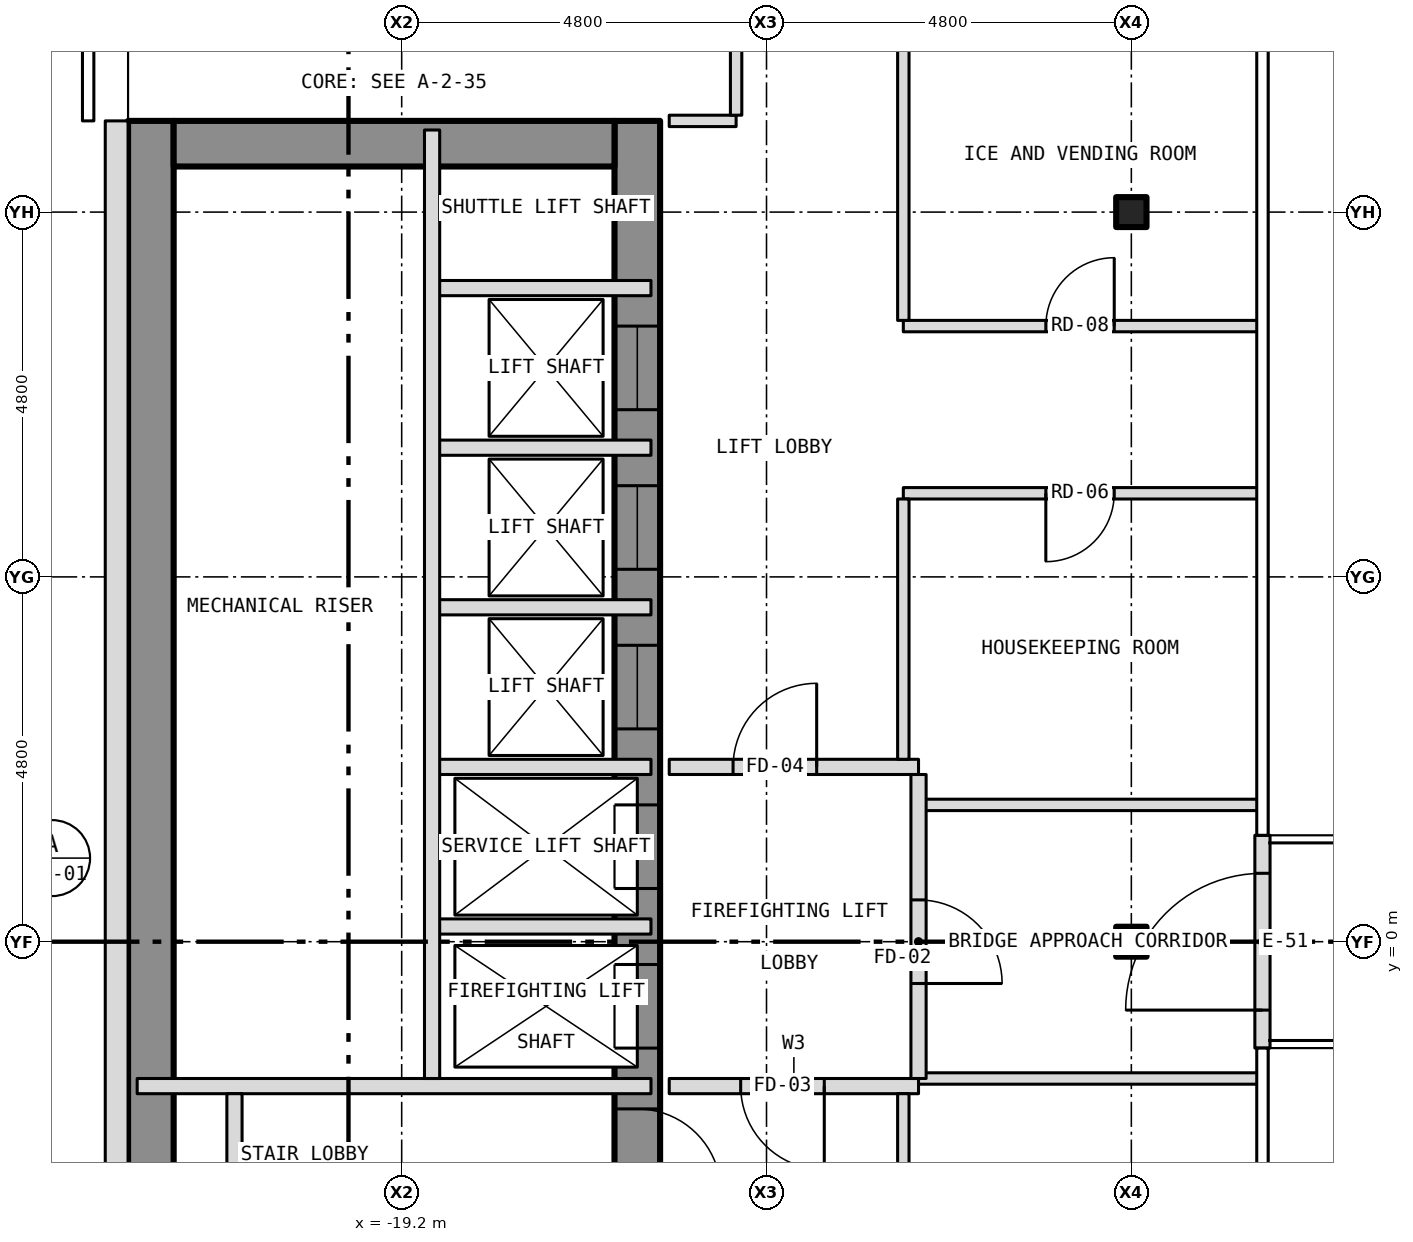
"""IFC4 building model, lengths in metres.
Left out: names, types, materials, properties, quantities, classifications, styles, units other than length and angle.
Written with IfcOpenShell. Run it as: python <this file> out.ifc"""

import sys

from ifc_helpers import new_model, si_unit, direction, frame, frame_2d, origin, origin_2d, place, context, subcontext, project, spatial, rectangle, i_section, extrude, element, fill, save


model = new_model("IFC4")
c1 = context("Model", 3, precision=1e-05, world=origin(), true_north=direction((0.0, 1.0)))
c2 = subcontext(c1, "Body", "Model", "MODEL_VIEW")
j1 = project(units=[si_unit("LENGTHUNIT", "METRE"), si_unit("PLANEANGLEUNIT", "RADIAN")], contexts=[c1])
p1 = place(None, origin())
s1 = spatial("IfcSite", under=j1, at=p1, CompositionType="ELEMENT")
p2 = place(p1, origin())
s2 = spatial("IfcBuilding", under=s1, at=p2, CompositionType="ELEMENT")
p3 = place(p2, frame((0.0, 0.0, 127.5)))
s3 = spatial("IfcBuildingStorey", under=s2, at=p3, CompositionType="ELEMENT", Elevation=127.5)
for number, where, z_axis, x_axis in (
    (1, (-9.6, 0.0, -0.15), (0.0, 0.0, 1.0), (1.0, 0.0, 0.0)),
    (2, (-9.6, 9.6, -0.15), (0.0, 0.0, 1.0), (1.0, 0.0, 0.0)),
):
    element("IfcColumn", number, at=place(p3, frame(where, z_axis=z_axis, x_axis=x_axis)), inside=s3, PredefinedType="COLUMN", context=c2, shape_type="SweptSolid", body=[
        extrude(i_section(OverallWidth=0.399, OverallDepth=0.394, WebThickness=0.023, FlangeThickness=0.037, at=origin_2d()), origin(), (0.0, 0.0, 1.0), 3.5),
    ])
p4 = place(p3, frame((-16.1, -10.8, 0.0), z_axis=(0.0, 0.0, 1.0), x_axis=(0.0, 1.0, 0.0)))
e3 = element("IfcWall", 3, at=p4, inside=s3, PredefinedType="SHEAR", context=c2, shape_type="SweptSolid", body=[
    extrude(rectangle(XDim=21.6, YDim=0.6, at=frame_2d((10.8, 0.0))), origin(), (0.0, 0.0, 1.0), 3.25),
])
p5 = place(p4, frame((9.4, 0.0, 0.0)))
e4 = element("IfcOpeningElement", 4, at=p5, cuts=e3, PredefinedType="OPENING", context=c2, shape_type="SweptSolid", body=[
    extrude(rectangle(XDim=1.1, YDim=2.1, at=frame_2d((0.55, 1.05))), frame((0.0, 0.312, 0.0), z_axis=(0.0, -1.0, 0.0), x_axis=(1.0, 0.0, 0.0)), (0.0, 0.0, 1.0), 0.624),
])
p6 = place(p4, frame((11.5, 0.0, 0.0)))
e5 = element("IfcOpeningElement", 5, at=p6, cuts=e3, PredefinedType="OPENING", context=c2, shape_type="SweptSolid", body=[
    extrude(rectangle(XDim=1.1, YDim=2.1, at=frame_2d((0.55, 1.05))), frame((0.0, 0.312, 0.0), z_axis=(0.0, -1.0, 0.0), x_axis=(1.0, 0.0, 0.0)), (0.0, 0.0, 1.0), 0.624),
])
p7 = place(p4, frame((13.6, 0.0, 0.0)))
e6 = element("IfcOpeningElement", 6, at=p7, cuts=e3, PredefinedType="OPENING", context=c2, shape_type="SweptSolid", body=[
    extrude(rectangle(XDim=1.1, YDim=2.1, at=frame_2d((0.55, 1.05))), frame((0.0, 0.312, 0.0), z_axis=(0.0, -1.0, 0.0), x_axis=(1.0, 0.0, 0.0)), (0.0, 0.0, 1.0), 0.624),
])
p8 = place(p4, frame((15.7, 0.0, 0.0)))
e7 = element("IfcOpeningElement", 7, at=p8, cuts=e3, PredefinedType="OPENING", context=c2, shape_type="SweptSolid", body=[
    extrude(rectangle(XDim=1.1, YDim=2.1, at=frame_2d((0.55, 1.05))), frame((0.0, 0.312, 0.0), z_axis=(0.0, -1.0, 0.0), x_axis=(1.0, 0.0, 0.0)), (0.0, 0.0, 1.0), 0.624),
])
p9 = place(p4, frame((17.8, 0.0, 0.0)))
e8 = element("IfcOpeningElement", 8, at=p9, cuts=e3, PredefinedType="OPENING", context=c2, shape_type="SweptSolid", body=[
    extrude(rectangle(XDim=1.1, YDim=2.1, at=frame_2d((0.55, 1.05))), frame((0.0, 0.312, 0.0), z_axis=(0.0, -1.0, 0.0), x_axis=(1.0, 0.0, 0.0)), (0.0, 0.0, 1.0), 0.624),
])
p10 = place(p4, frame((0.758, 0.0, 0.0)))
e9 = element("IfcOpeningElement", 9, at=p10, cuts=e3, PredefinedType="OPENING", context=c2, shape_type="SweptSolid", body=[
    extrude(rectangle(XDim=1.1, YDim=2.1, at=frame_2d((0.55, 1.05))), frame((0.0, 0.312, 0.0), z_axis=(0.0, -1.0, 0.0), x_axis=(1.0, 0.0, 0.0)), (0.0, 0.0, 1.0), 0.624),
])
p11 = place(p4, frame((7.5, 0.0, 0.0)))
e10 = element("IfcOpeningElement", 10, at=p11, cuts=e3, PredefinedType="OPENING", context=c2, shape_type="SweptSolid", body=[
    extrude(rectangle(XDim=1.1, YDim=2.1, at=frame_2d((0.55, 1.05))), frame((0.0, 0.312, 0.0), z_axis=(0.0, -1.0, 0.0), x_axis=(1.0, 0.0, 0.0)), (0.0, 0.0, 1.0), 0.624),
])
p12 = place(p3, frame((-22.5, -10.8, 0.0), z_axis=(0.0, 0.0, 1.0), x_axis=(0.0, 1.0, 0.0)))
e11 = element("IfcWall", 11, at=p12, inside=s3, PredefinedType="SHEAR", context=c2, shape_type="SweptSolid", body=[
    extrude(rectangle(XDim=21.6, YDim=0.6, at=frame_2d((10.8, 0.0))), origin(), (0.0, 0.0, 1.0), 3.25),
])
p13 = place(p3, frame((-22.2, 10.5, 0.0), z_axis=(0.0, 0.0, 1.0), x_axis=(1.0, 0.0, 0.0)))
e12 = element("IfcWall", 12, at=p13, inside=s3, PredefinedType="SHEAR", context=c2, shape_type="SweptSolid", body=[
    extrude(rectangle(XDim=5.8, YDim=0.6, at=frame_2d((2.9, 0.0))), origin(), (0.0, 0.0, 1.0), 3.25),
])
p14 = place(p3, frame((-22.95, 10.8, 0.0), z_axis=(0.0, 0.0, 1.0), x_axis=(0.0, -1.0, 0.0)))
e13 = element("IfcWall", 13, at=p14, inside=s3, PredefinedType="SOLIDWALL", context=c2, shape_type="SweptSolid", body=[
    extrude(rectangle(XDim=21.6, YDim=0.3, at=frame_2d((10.8, 0.0))), origin(), (0.0, 0.0, 1.0), 3.5),
])
p15 = place(p14, frame((18.05, 0.0, 1.0)))
e14 = element("IfcOpeningElement", 14, at=p15, cuts=e13, PredefinedType="OPENING", context=c2, shape_type="SweptSolid", body=[
    extrude(rectangle(XDim=0.6, YDim=1.5, at=frame_2d((0.3, 0.75))), frame((0.0, 0.162, 0.0), z_axis=(0.0, -1.0, 0.0), x_axis=(1.0, 0.0, 0.0)), (0.0, 0.0, 1.0), 0.324),
])
p16 = place(p3, frame((-7.875, -1.4, 0.0), z_axis=(0.0, 0.0, 1.0), x_axis=(0.0, 1.0, 0.0)))
e15 = element("IfcWall", 15, at=p16, inside=s3, PredefinedType="SOLIDWALL", context=c2, shape_type="SweptSolid", body=[
    extrude(rectangle(XDim=2.8, YDim=0.2, at=frame_2d((1.4, 0.0))), origin(), (0.0, 0.0, 1.0), 3.5),
])
p17 = place(p16, frame((0.5, 0.0, 0.0)))
e16 = element("IfcOpeningElement", 16, at=p17, cuts=e15, PredefinedType="OPENING", context=c2, shape_type="SweptSolid", body=[
    extrude(rectangle(XDim=1.8, YDim=2.1, at=frame_2d((0.9, 1.05))), frame((0.0, 0.112, 0.0), z_axis=(0.0, -1.0, 0.0), x_axis=(1.0, 0.0, 0.0)), (0.0, 0.0, 1.0), 0.224),
])
p18 = place(p3, frame((-22.68, -1.9, 0.0), z_axis=(0.0, 0.0, 1.0), x_axis=(1.0, 0.0, 0.0)))
e17 = element("IfcWall", 17, at=p18, inside=s3, PredefinedType="PARTITIONING", context=c2, shape_type="SweptSolid", body=[
    extrude(rectangle(XDim=6.76, YDim=0.2, at=frame_2d((3.38, 0.0))), origin(), (0.0, 0.0, 1.0), 3.25),
])
p19 = place(p3, frame((-15.68, -1.9, 0.0), z_axis=(0.0, 0.0, 1.0), x_axis=(1.0, 0.0, 0.0)))
e18 = element("IfcWall", 18, at=p19, inside=s3, PredefinedType="PARTITIONING", context=c2, shape_type="SweptSolid", body=[
    extrude(rectangle(XDim=3.28, YDim=0.2, at=frame_2d((1.64, 0.0))), origin(), (0.0, 0.0, 1.0), 3.35),
])
p20 = place(p19, frame((0.94, 0.0, 0.0)))
e19 = element("IfcOpeningElement", 19, at=p20, cuts=e18, PredefinedType="OPENING", context=c2, shape_type="SweptSolid", body=[
    extrude(rectangle(XDim=1.1, YDim=2.1, at=frame_2d((0.55, 1.05))), frame((0.0, 0.112, 0.0), z_axis=(0.0, -1.0, 0.0), x_axis=(1.0, 0.0, 0.0)), (0.0, 0.0, 1.0), 0.224),
])
p21 = place(p3, frame((-12.4, -1.8, 0.0), z_axis=(0.0, 0.0, 1.0), x_axis=(1.0, 0.0, 0.0)))
e20 = element("IfcWall", 20, at=p21, inside=s3, PredefinedType="PARTITIONING", context=c2, shape_type="SweptSolid", body=[
    extrude(rectangle(XDim=4.48, YDim=0.15, at=frame_2d((2.24, 0.0))), origin(), (0.0, 0.0, 1.0), 3.35),
])
p22 = place(p3, frame((-18.8, 0.2, 0.0), z_axis=(0.0, 0.0, 1.0), x_axis=(1.0, 0.0, 0.0)))
e21 = element("IfcWall", 21, at=p22, inside=s3, PredefinedType="PARTITIONING", context=c2, shape_type="SweptSolid", body=[
    extrude(rectangle(XDim=2.88, YDim=0.2, at=frame_2d((1.44, 0.0))), origin(), (0.0, 0.0, 1.0), 3.25),
])
p23 = place(p3, frame((-12.4, 1.8, 0.0), z_axis=(0.0, 0.0, 1.0), x_axis=(1.0, 0.0, 0.0)))
e22 = element("IfcWall", 22, at=p23, inside=s3, PredefinedType="PARTITIONING", context=c2, shape_type="SweptSolid", body=[
    extrude(rectangle(XDim=4.48, YDim=0.15, at=frame_2d((2.24, 0.0))), origin(), (0.0, 0.0, 1.0), 3.35),
])
p24 = place(p3, frame((-18.8, 2.3, 0.0), z_axis=(0.0, 0.0, 1.0), x_axis=(1.0, 0.0, 0.0)))
e23 = element("IfcWall", 23, at=p24, inside=s3, PredefinedType="PARTITIONING", context=c2, shape_type="SweptSolid", body=[
    extrude(rectangle(XDim=2.88, YDim=0.2, at=frame_2d((1.44, 0.0))), origin(), (0.0, 0.0, 1.0), 3.25),
])
p25 = place(p3, frame((-15.68, 2.3, 0.0), z_axis=(0.0, 0.0, 1.0), x_axis=(1.0, 0.0, 0.0)))
e24 = element("IfcWall", 24, at=p25, inside=s3, PredefinedType="PARTITIONING", context=c2, shape_type="SweptSolid", body=[
    extrude(rectangle(XDim=3.28, YDim=0.2, at=frame_2d((1.64, 0.0))), origin(), (0.0, 0.0, 1.0), 3.35),
])
p26 = place(p25, frame((0.84, 0.0, 0.0)))
e25 = element("IfcOpeningElement", 25, at=p26, cuts=e24, PredefinedType="OPENING", context=c2, shape_type="SweptSolid", body=[
    extrude(rectangle(XDim=1.1, YDim=2.1, at=frame_2d((0.55, 1.05))), frame((0.0, 0.112, 0.0), z_axis=(0.0, -1.0, 0.0), x_axis=(1.0, 0.0, 0.0)), (0.0, 0.0, 1.0), 0.224),
])
p27 = place(p3, frame((-18.8, 4.4, 0.0), z_axis=(0.0, 0.0, 1.0), x_axis=(1.0, 0.0, 0.0)))
e26 = element("IfcWall", 26, at=p27, inside=s3, PredefinedType="PARTITIONING", context=c2, shape_type="SweptSolid", body=[
    extrude(rectangle(XDim=2.88, YDim=0.2, at=frame_2d((1.44, 0.0))), origin(), (0.0, 0.0, 1.0), 3.25),
])
p28 = place(p3, frame((-12.6, 5.9, 0.0), z_axis=(0.0, 0.0, 1.0), x_axis=(1.0, 0.0, 0.0)))
e27 = element("IfcWall", 27, at=p28, inside=s3, PredefinedType="PARTITIONING", context=c2, shape_type="SweptSolid", body=[
    extrude(rectangle(XDim=4.68, YDim=0.15, at=frame_2d((2.34, 0.0))), origin(), (0.0, 0.0, 1.0), 3.35),
])
p29 = place(p28, frame((1.875, 0.0, 0.0)))
e28 = element("IfcOpeningElement", 28, at=p29, cuts=e27, PredefinedType="OPENING", context=c2, shape_type="SweptSolid", body=[
    extrude(rectangle(XDim=0.9, YDim=2.1, at=frame_2d((0.45, 1.05))), frame((0.0, 0.087, 0.0), z_axis=(0.0, -1.0, 0.0), x_axis=(1.0, 0.0, 0.0)), (0.0, 0.0, 1.0), 0.174),
])
p30 = place(p3, frame((-18.8, 6.5, 0.0), z_axis=(0.0, 0.0, 1.0), x_axis=(1.0, 0.0, 0.0)))
e29 = element("IfcWall", 29, at=p30, inside=s3, PredefinedType="PARTITIONING", context=c2, shape_type="SweptSolid", body=[
    extrude(rectangle(XDim=2.88, YDim=0.2, at=frame_2d((1.44, 0.0))), origin(), (0.0, 0.0, 1.0), 3.25),
])
p31 = place(p3, frame((-12.6, 8.1, 0.0), z_axis=(0.0, 0.0, 1.0), x_axis=(1.0, 0.0, 0.0)))
e30 = element("IfcWall", 30, at=p31, inside=s3, PredefinedType="PARTITIONING", context=c2, shape_type="SweptSolid", body=[
    extrude(rectangle(XDim=4.68, YDim=0.15, at=frame_2d((2.34, 0.0))), origin(), (0.0, 0.0, 1.0), 3.35),
])
p32 = place(p31, frame((1.875, 0.0, 0.0)))
e31 = element("IfcOpeningElement", 31, at=p32, cuts=e30, PredefinedType="OPENING", context=c2, shape_type="SweptSolid", body=[
    extrude(rectangle(XDim=0.9, YDim=2.1, at=frame_2d((0.45, 1.05))), frame((0.0, 0.087, 0.0), z_axis=(0.0, -1.0, 0.0), x_axis=(1.0, 0.0, 0.0)), (0.0, 0.0, 1.0), 0.174),
])
p33 = place(p3, frame((-18.8, 8.6, 0.0), z_axis=(0.0, 0.0, 1.0), x_axis=(1.0, 0.0, 0.0)))
e32 = element("IfcWall", 32, at=p33, inside=s3, PredefinedType="PARTITIONING", context=c2, shape_type="SweptSolid", body=[
    extrude(rectangle(XDim=2.88, YDim=0.2, at=frame_2d((1.44, 0.0))), origin(), (0.0, 0.0, 1.0), 3.25),
])
p34 = place(p3, frame((-15.68, 10.8, 0.0), z_axis=(0.0, 0.0, 1.0), x_axis=(1.0, 0.0, 0.0)))
e33 = element("IfcWall", 33, at=p34, inside=s3, PredefinedType="PARTITIONING", context=c2, shape_type="SweptSolid", body=[
    extrude(rectangle(XDim=0.88, YDim=0.15, at=frame_2d((0.44, 0.0))), origin(), (0.0, 0.0, 1.0), 3.35),
])
p35 = place(p3, frame((-21.4, -10.68, 0.0), z_axis=(0.0, 0.0, 1.0), x_axis=(0.0, 1.0, 0.0)))
e34 = element("IfcWall", 34, at=p35, inside=s3, PredefinedType="PARTITIONING", context=c2, shape_type="SweptSolid", body=[
    extrude(rectangle(XDim=8.68, YDim=0.2, at=frame_2d((4.34, 0.0))), origin(), (0.0, 0.0, 1.0), 3.25),
])
p36 = place(p35, frame((3.88, 0.0, 0.0)))
e35 = element("IfcOpeningElement", 35, at=p36, cuts=e34, PredefinedType="OPENING", context=c2, shape_type="SweptSolid", body=[
    extrude(rectangle(XDim=0.9, YDim=2.1, at=frame_2d((0.45, 1.05))), frame((0.0, 0.112, 0.0), z_axis=(0.0, -1.0, 0.0), x_axis=(1.0, 0.0, 0.0)), (0.0, 0.0, 1.0), 0.224),
])
p37 = place(p3, frame((-18.8, -1.8, 0.0), z_axis=(0.0, 0.0, 1.0), x_axis=(0.0, 1.0, 0.0)))
e36 = element("IfcWall", 36, at=p37, inside=s3, PredefinedType="PARTITIONING", context=c2, shape_type="SweptSolid", body=[
    extrude(rectangle(XDim=12.48, YDim=0.2, at=frame_2d((6.24, 0.0))), origin(), (0.0, 0.0, 1.0), 3.25),
])
p38 = place(p3, frame((-14.8, 10.875, 0.0), z_axis=(0.0, 0.0, 1.0), x_axis=(0.0, 1.0, 0.0)))
e37 = element("IfcWall", 37, at=p38, inside=s3, PredefinedType="PARTITIONING", context=c2, shape_type="SweptSolid", body=[
    extrude(rectangle(XDim=3.85, YDim=0.15, at=frame_2d((1.925, 0.0))), origin(), (0.0, 0.0, 1.0), 3.35),
])
p39 = place(p38, frame((2.325, 0.0, 0.0)))
e38 = element("IfcOpeningElement", 38, at=p39, cuts=e37, PredefinedType="OPENING", context=c2, shape_type="SweptSolid", body=[
    extrude(rectangle(XDim=1.0, YDim=2.1, at=frame_2d((0.5, 1.05))), frame((0.0, 0.087, 0.0), z_axis=(0.0, -1.0, 0.0), x_axis=(1.0, 0.0, 0.0)), (0.0, 0.0, 1.0), 0.174),
])
p40 = place(p3, frame((-12.6, -12.525, 0.0), z_axis=(0.0, 0.0, 1.0), x_axis=(0.0, 1.0, 0.0)))
e39 = element("IfcWall", 39, at=p40, inside=s3, PredefinedType="PARTITIONING", context=c2, shape_type="SweptSolid", body=[
    extrude(rectangle(XDim=10.525, YDim=0.15, at=frame_2d((5.262, 0.0))), origin(), (0.0, 0.0, 1.0), 3.35),
])
p41 = place(p40, frame((4.825, 0.0, 0.0)))
e40 = element("IfcOpeningElement", 40, at=p41, cuts=e39, PredefinedType="OPENING", context=c2, shape_type="SweptSolid", body=[
    extrude(rectangle(XDim=0.9, YDim=2.1, at=frame_2d((0.45, 1.05))), frame((0.0, 0.087, 0.0), z_axis=(0.0, -1.0, 0.0), x_axis=(1.0, 0.0, 0.0)), (0.0, 0.0, 1.0), 0.174),
])
p42 = place(p3, frame((-12.6, 2.4, 0.0), z_axis=(0.0, 0.0, 1.0), x_axis=(0.0, 1.0, 0.0)))
e41 = element("IfcWall", 41, at=p42, inside=s3, PredefinedType="PARTITIONING", context=c2, shape_type="SweptSolid", body=[
    extrude(rectangle(XDim=3.425, YDim=0.15, at=frame_2d((1.712, 0.0))), origin(), (0.0, 0.0, 1.0), 3.35),
])
p43 = place(p3, frame((-12.6, 8.175, 0.0), z_axis=(0.0, 0.0, 1.0), x_axis=(0.0, 1.0, 0.0)))
e42 = element("IfcWall", 42, at=p43, inside=s3, PredefinedType="PARTITIONING", context=c2, shape_type="SweptSolid", body=[
    extrude(rectangle(XDim=4.35, YDim=0.15, at=frame_2d((2.175, 0.0))), origin(), (0.0, 0.0, 1.0), 3.35),
])
p44 = place(p3, frame((-12.4, -1.8, 0.0), z_axis=(0.0, 0.0, 1.0), x_axis=(0.0, 1.0, 0.0)))
e43 = element("IfcWall", 43, at=p44, inside=s3, PredefinedType="PARTITIONING", context=c2, shape_type="SweptSolid", body=[
    extrude(rectangle(XDim=4.0, YDim=0.2, at=frame_2d((2.0, 0.0))), origin(), (0.0, 0.0, 1.0), 3.35),
])
p45 = place(p44, frame((1.25, 0.0, 0.0)))
e44 = element("IfcOpeningElement", 44, at=p45, cuts=e43, PredefinedType="OPENING", context=c2, shape_type="SweptSolid", body=[
    extrude(rectangle(XDim=1.1, YDim=2.1, at=frame_2d((0.55, 1.05))), frame((0.0, 0.112, 0.0), z_axis=(0.0, -1.0, 0.0), x_axis=(1.0, 0.0, 0.0)), (0.0, 0.0, 1.0), 0.224),
])
p46 = place(p17, origin())
e45 = element("IfcDoor", 45, at=p46, inside=s3, OperationType="DOUBLE_DOOR_DOUBLE_SWING", PredefinedType="DOOR", context=c2, shape_type="SweptSolid", body=[
    extrude(rectangle(XDim=1.8, YDim=2.1, at=frame_2d((0.9, 1.05))), frame((0.0, 0.025, 0.0), z_axis=(0.0, -1.0, 0.0), x_axis=(1.0, 0.0, 0.0)), (0.0, 0.0, 1.0), 0.05),
])
fill(e16, e45)
p47 = place(p5, origin())
e46 = element("IfcDoor", 46, at=p47, inside=s3, OperationType="SLIDING_TO_LEFT", PredefinedType="DOOR", context=c2, shape_type="SweptSolid", body=[
    extrude(rectangle(XDim=1.1, YDim=2.1, at=frame_2d((0.55, 1.05))), frame((0.0, 0.025, 0.0), z_axis=(0.0, -1.0, 0.0), x_axis=(1.0, 0.0, 0.0)), (0.0, 0.0, 1.0), 0.05),
])
fill(e4, e46)
p48 = place(p6, origin())
e47 = element("IfcDoor", 47, at=p48, inside=s3, OperationType="SLIDING_TO_LEFT", PredefinedType="DOOR", context=c2, shape_type="SweptSolid", body=[
    extrude(rectangle(XDim=1.1, YDim=2.1, at=frame_2d((0.55, 1.05))), frame((0.0, 0.025, 0.0), z_axis=(0.0, -1.0, 0.0), x_axis=(1.0, 0.0, 0.0)), (0.0, 0.0, 1.0), 0.05),
])
fill(e5, e47)
p49 = place(p7, origin())
e48 = element("IfcDoor", 48, at=p49, inside=s3, OperationType="SLIDING_TO_LEFT", PredefinedType="DOOR", context=c2, shape_type="SweptSolid", body=[
    extrude(rectangle(XDim=1.1, YDim=2.1, at=frame_2d((0.55, 1.05))), frame((0.0, 0.025, 0.0), z_axis=(0.0, -1.0, 0.0), x_axis=(1.0, 0.0, 0.0)), (0.0, 0.0, 1.0), 0.05),
])
fill(e6, e48)
p50 = place(p8, origin())
e49 = element("IfcDoor", 49, at=p50, inside=s3, OperationType="SLIDING_TO_LEFT", PredefinedType="DOOR", context=c2, shape_type="SweptSolid", body=[
    extrude(rectangle(XDim=1.1, YDim=2.1, at=frame_2d((0.55, 1.05))), frame((0.0, 0.025, 0.0), z_axis=(0.0, -1.0, 0.0), x_axis=(1.0, 0.0, 0.0)), (0.0, 0.0, 1.0), 0.05),
])
fill(e7, e49)
p51 = place(p9, origin())
e50 = element("IfcDoor", 50, at=p51, inside=s3, OperationType="SLIDING_TO_LEFT", PredefinedType="DOOR", context=c2, shape_type="SweptSolid", body=[
    extrude(rectangle(XDim=1.1, YDim=2.1, at=frame_2d((0.55, 1.05))), frame((0.0, 0.025, 0.0), z_axis=(0.0, -1.0, 0.0), x_axis=(1.0, 0.0, 0.0)), (0.0, 0.0, 1.0), 0.05),
])
fill(e8, e50)
p52 = place(p11, origin())
e51 = element("IfcDoor", 51, at=p52, inside=s3, OperationType="SINGLE_SWING_LEFT", PredefinedType="DOOR", context=c2, shape_type="SweptSolid", body=[
    extrude(rectangle(XDim=1.1, YDim=2.1, at=frame_2d((0.55, 1.05))), frame((0.0, 0.025, 0.0), z_axis=(0.0, -1.0, 0.0), x_axis=(1.0, 0.0, 0.0)), (0.0, 0.0, 1.0), 0.05),
])
fill(e10, e51)
p53 = place(p45, origin())
e52 = element("IfcDoor", 52, at=p53, inside=s3, OperationType="SINGLE_SWING_LEFT", PredefinedType="DOOR", context=c2, shape_type="SweptSolid", body=[
    extrude(rectangle(XDim=1.1, YDim=2.1, at=frame_2d((0.55, 1.05))), frame((0.0, 0.025, 0.0), z_axis=(0.0, -1.0, 0.0), x_axis=(1.0, 0.0, 0.0)), (0.0, 0.0, 1.0), 0.05),
])
fill(e44, e52)
p54 = place(p20, origin())
e53 = element("IfcDoor", 53, at=p54, inside=s3, OperationType="SINGLE_SWING_RIGHT", PredefinedType="DOOR", context=c2, shape_type="SweptSolid", body=[
    extrude(rectangle(XDim=1.1, YDim=2.1, at=frame_2d((0.55, 1.05))), frame((0.0, 0.025, 0.0), z_axis=(0.0, -1.0, 0.0), x_axis=(1.0, 0.0, 0.0)), (0.0, 0.0, 1.0), 0.05),
])
fill(e19, e53)
p55 = place(p26, origin())
e54 = element("IfcDoor", 54, at=p55, inside=s3, OperationType="SINGLE_SWING_RIGHT", PredefinedType="DOOR", context=c2, shape_type="SweptSolid", body=[
    extrude(rectangle(XDim=1.1, YDim=2.1, at=frame_2d((0.55, 1.05))), frame((0.0, 0.025, 0.0), z_axis=(0.0, -1.0, 0.0), x_axis=(1.0, 0.0, 0.0)), (0.0, 0.0, 1.0), 0.05),
])
fill(e25, e54)
p56 = place(p29, origin())
e55 = element("IfcDoor", 55, at=p56, inside=s3, OperationType="SINGLE_SWING_LEFT", PredefinedType="DOOR", context=c2, shape_type="SweptSolid", body=[
    extrude(rectangle(XDim=0.9, YDim=2.1, at=frame_2d((0.45, 1.05))), frame((0.0, 0.025, 0.0), z_axis=(0.0, -1.0, 0.0), x_axis=(1.0, 0.0, 0.0)), (0.0, 0.0, 1.0), 0.05),
])
fill(e28, e55)
p57 = place(p32, origin())
e56 = element("IfcDoor", 56, at=p57, inside=s3, OperationType="SINGLE_SWING_RIGHT", PredefinedType="DOOR", context=c2, shape_type="SweptSolid", body=[
    extrude(rectangle(XDim=0.9, YDim=2.1, at=frame_2d((0.45, 1.05))), frame((0.0, 0.025, 0.0), z_axis=(0.0, -1.0, 0.0), x_axis=(1.0, 0.0, 0.0)), (0.0, 0.0, 1.0), 0.05),
])
fill(e31, e56)
save(model, sys.argv[1])
